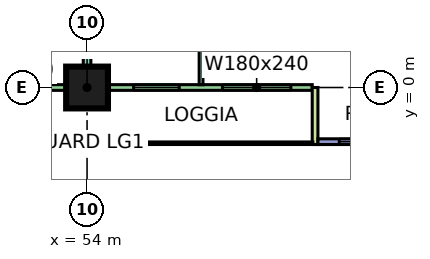
"""IFC4 building model, lengths in metres.
Left out: names, types, materials, properties, quantities, classifications, styles, units other than length and angle.
Written with IfcOpenShell. Run it as: python <this file> out.ifc"""

import sys

from ifc_helpers import new_model, si_unit, direction, frame, frame_2d, origin, origin_2d, place, context, subcontext, project, spatial, rectangle, extrude, element, fill, save


model = new_model("IFC4")
c1 = context("Model", 3, precision=1e-05, world=origin(), true_north=direction((0.0, 1.0)))
c2 = subcontext(c1, "Body", "Model", "MODEL_VIEW")
j1 = project(units=[si_unit("LENGTHUNIT", "METRE"), si_unit("PLANEANGLEUNIT", "RADIAN")], contexts=[c1])
p1 = place(None, origin())
s1 = spatial("IfcSite", under=j1, at=p1, CompositionType="ELEMENT")
p2 = place(p1, origin())
s2 = spatial("IfcBuilding", under=s1, at=p2, CompositionType="ELEMENT")
p3 = place(p2, frame((0.0, 0.0, 52.65)))
s3 = spatial("IfcBuildingStorey", under=s2, at=p3, CompositionType="ELEMENT", Elevation=52.65)
p4 = place(p3, frame((54.0, 0.0, 0.0), z_axis=(0.0, 0.0, 1.0), x_axis=(1.0, 0.0, 0.0)))
e1 = element("IfcColumn", 1, at=p4, inside=s3, PredefinedType="COLUMN", context=c2, shape_type="SweptSolid", body=[
    extrude(rectangle(XDim=1.1, YDim=1.1, at=origin_2d()), origin(), (0.0, 0.0, 1.0), 3.75),
])
p5 = place(p3, frame((48.075, 0.0, 0.0), z_axis=(0.0, 0.0, 1.0), x_axis=(1.0, 0.0, 0.0)))
e2 = element("IfcWall", 2, at=p5, inside=s3, PredefinedType="SOLIDWALL", context=c2, shape_type="SweptSolid", body=[
    extrude(rectangle(XDim=11.85, YDim=0.15, at=frame_2d((5.925, 0.0))), origin(), (0.0, 0.0, 1.0), 3.35),
])
p6 = place(p5, frame((0.562, 0.0, 0.45)))
e3 = element("IfcOpeningElement", 3, at=p6, cuts=e2, PredefinedType="OPENING", context=c2, shape_type="SweptSolid", body=[
    extrude(rectangle(XDim=1.8, YDim=2.4, at=frame_2d((0.9, 1.2))), frame((0.0, 0.085, 0.0), z_axis=(0.0, -1.0, 0.0), x_axis=(1.0, 0.0, 0.0)), (0.0, 0.0, 1.0), 0.17),
])
p7 = place(p5, frame((3.5, 0.0, 0.45)))
e4 = element("IfcOpeningElement", 4, at=p7, cuts=e2, PredefinedType="OPENING", context=c2, shape_type="SweptSolid", body=[
    extrude(rectangle(XDim=1.2, YDim=2.4, at=frame_2d((0.6, 1.2))), frame((0.0, 0.085, 0.0), z_axis=(0.0, -1.0, 0.0), x_axis=(1.0, 0.0, 0.0)), (0.0, 0.0, 1.0), 0.17),
])
p8 = place(p5, frame((7.15, 0.0, 0.45)))
e5 = element("IfcOpeningElement", 5, at=p8, cuts=e2, PredefinedType="OPENING", context=c2, shape_type="SweptSolid", body=[
    extrude(rectangle(XDim=1.2, YDim=2.4, at=frame_2d((0.6, 1.2))), frame((0.0, 0.085, 0.0), z_axis=(0.0, -1.0, 0.0), x_axis=(1.0, 0.0, 0.0)), (0.0, 0.0, 1.0), 0.17),
])
p9 = place(p5, frame((9.488, 0.0, 0.45)))
e6 = element("IfcOpeningElement", 6, at=p9, cuts=e2, PredefinedType="OPENING", context=c2, shape_type="SweptSolid", body=[
    extrude(rectangle(XDim=1.8, YDim=2.4, at=frame_2d((0.9, 1.2))), frame((0.0, 0.085, 0.0), z_axis=(0.0, -1.0, 0.0), x_axis=(1.0, 0.0, 0.0)), (0.0, 0.0, 1.0), 0.17),
])
p10 = place(p3, frame((60.0, -1.5, 0.0), z_axis=(0.0, 0.0, 1.0), x_axis=(0.0, 1.0, 0.0)))
e7 = element("IfcWall", 7, at=p10, inside=s3, PredefinedType="SOLIDWALL", context=c2, shape_type="SweptSolid", body=[
    extrude(rectangle(XDim=1.5, YDim=0.15, at=frame_2d((0.75, 0.0))), origin(), (0.0, 0.0, 1.0), 3.35),
])
p11 = place(p3, frame((60.075, -1.425, 0.0), z_axis=(0.0, 0.0, 1.0), x_axis=(1.0, 0.0, 0.0)))
e8 = element("IfcWall", 8, at=p11, inside=s3, PredefinedType="SOLIDWALL", context=c2, shape_type="SweptSolid", body=[
    extrude(rectangle(XDim=10.425, YDim=0.15, at=frame_2d((5.212, 0.0))), origin(), (0.0, 0.0, 1.0), 3.35),
])
p12 = place(p11, frame((0.562, 0.0, 0.45)))
e9 = element("IfcOpeningElement", 9, at=p12, cuts=e8, PredefinedType="OPENING", context=c2, shape_type="SweptSolid", body=[
    extrude(rectangle(XDim=1.8, YDim=2.4, at=frame_2d((0.9, 1.2))), frame((0.0, 0.085, 0.0), z_axis=(0.0, -1.0, 0.0), x_axis=(1.0, 0.0, 0.0)), (0.0, 0.0, 1.0), 0.17),
])
p13 = place(p11, frame((3.525, 0.0, 0.45)))
e10 = element("IfcOpeningElement", 10, at=p13, cuts=e8, PredefinedType="OPENING", context=c2, shape_type="SweptSolid", body=[
    extrude(rectangle(XDim=1.8, YDim=2.4, at=frame_2d((0.9, 1.2))), frame((0.0, 0.085, 0.0), z_axis=(0.0, -1.0, 0.0), x_axis=(1.0, 0.0, 0.0)), (0.0, 0.0, 1.0), 0.17),
])
p14 = place(p11, frame((6.675, 0.0, 0.45)))
e11 = element("IfcOpeningElement", 11, at=p14, cuts=e8, PredefinedType="OPENING", context=c2, shape_type="SweptSolid", body=[
    extrude(rectangle(XDim=3.0, YDim=2.4, at=frame_2d((1.5, 1.2))), frame((0.0, 0.085, 0.0), z_axis=(0.0, -1.0, 0.0), x_axis=(1.0, 0.0, 0.0)), (0.0, 0.0, 1.0), 0.17),
])
p15 = place(p3, frame((54.0, 0.074, 0.0), z_axis=(0.0, 0.0, 1.0), x_axis=(0.0, 1.0, 0.0)))
e12 = element("IfcWall", 12, at=p15, inside=s3, PredefinedType="PARTITIONING", context=c2, shape_type="SweptSolid", body=[
    extrude(rectangle(XDim=5.901, YDim=0.2, at=frame_2d((2.951, 0.0))), origin(), (0.0, 0.0, 1.0), 3.35),
])
p16 = place(p3, frame((57.0, 0.074, 0.0), z_axis=(0.0, 0.0, 1.0), x_axis=(0.0, 1.0, 0.0)))
e13 = element("IfcWall", 13, at=p16, inside=s3, PredefinedType="PARTITIONING", context=c2, shape_type="SweptSolid", body=[
    extrude(rectangle(XDim=5.926, YDim=0.1, at=frame_2d((2.963, 0.0))), origin(), (0.0, 0.0, 1.0), 3.35),
])
p17 = place(p8, origin())
e14 = element("IfcWindow", 14, at=p17, inside=s3, PartitioningType="SINGLE_PANEL", PredefinedType="WINDOW", context=c2, shape_type="SweptSolid", body=[
    extrude(rectangle(XDim=1.2, YDim=2.4, at=frame_2d((0.6, 1.2))), frame((0.0, 0.03, 0.0), z_axis=(0.0, -1.0, 0.0), x_axis=(1.0, 0.0, 0.0)), (0.0, 0.0, 1.0), 0.06),
])
fill(e5, e14)
p18 = place(p9, origin())
e15 = element("IfcWindow", 15, at=p18, inside=s3, PartitioningType="SINGLE_PANEL", PredefinedType="WINDOW", context=c2, shape_type="SweptSolid", body=[
    extrude(rectangle(XDim=1.8, YDim=2.4, at=frame_2d((0.9, 1.2))), frame((0.0, 0.03, 0.0), z_axis=(0.0, -1.0, 0.0), x_axis=(1.0, 0.0, 0.0)), (0.0, 0.0, 1.0), 0.06),
])
fill(e6, e15)
p19 = place(p12, origin())
e16 = element("IfcWindow", 16, at=p19, inside=s3, PartitioningType="SINGLE_PANEL", PredefinedType="WINDOW", context=c2, shape_type="SweptSolid", body=[
    extrude(rectangle(XDim=1.8, YDim=2.4, at=frame_2d((0.9, 1.2))), frame((0.0, 0.03, 0.0), z_axis=(0.0, -1.0, 0.0), x_axis=(1.0, 0.0, 0.0)), (0.0, 0.0, 1.0), 0.06),
])
fill(e9, e16)
save(model, sys.argv[1])
